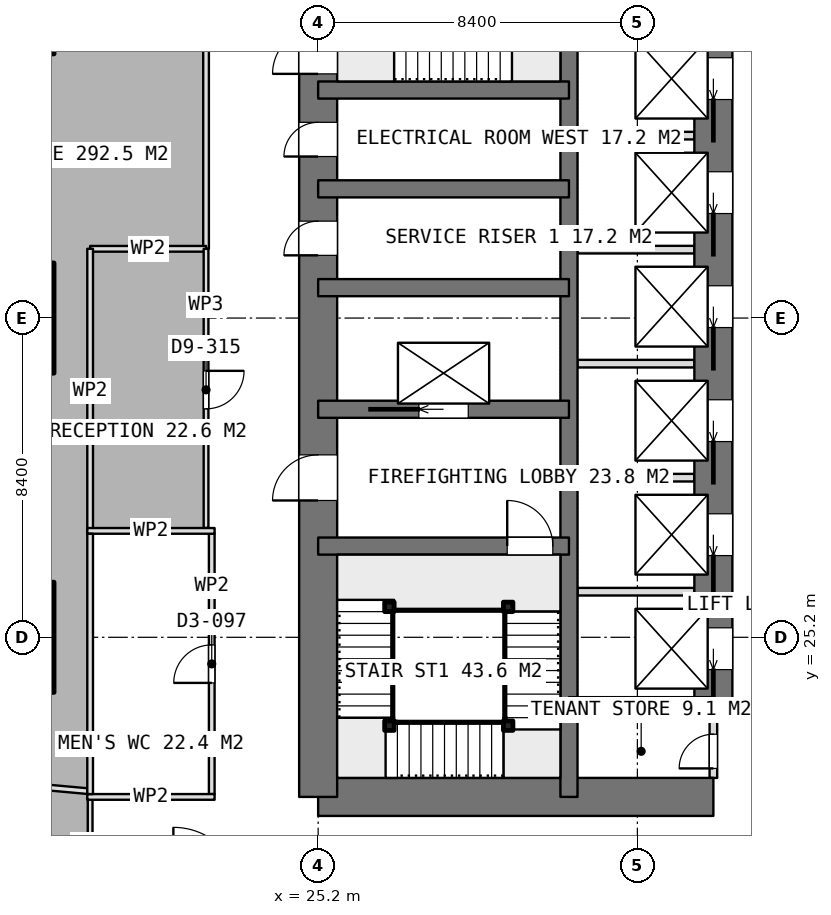
"""IFC4 building model, lengths in metres.
Left out: names, types, materials, properties, quantities, classifications, styles, units other than length and angle.
Written with IfcOpenShell. Run it as: python <this file> out.ifc"""

import sys

from ifc_helpers import new_model, si_unit, direction, frame, frame_2d, origin, origin_2d, place, context, subcontext, project, spatial, rectangle, extrude, element, fill, save


model = new_model("IFC4")
c1 = context("Model", 3, precision=1e-05, world=origin(), true_north=direction((0.0, 1.0)))
c2 = subcontext(c1, "Body", "Model", "MODEL_VIEW")
j1 = project(units=[si_unit("LENGTHUNIT", "METRE"), si_unit("PLANEANGLEUNIT", "RADIAN")], contexts=[c1])
p1 = place(None, origin())
s1 = spatial("IfcSite", under=j1, at=p1, CompositionType="ELEMENT")
p2 = place(p1, origin())
s2 = spatial("IfcBuilding", under=s1, at=p2, CompositionType="ELEMENT")
p3 = place(p2, frame((0.0, 0.0, 95.3)))
s3 = spatial("IfcBuildingStorey", under=s2, at=p3, CompositionType="ELEMENT", Elevation=95.3)
p4 = place(p3, frame((25.2, 21.0, 0.0), z_axis=(0.0, 0.0, 1.0), x_axis=(1.0, 0.0, 0.0)))
e1 = element("IfcWall", 1, at=p4, inside=s3, PredefinedType="SHEAR", context=c2, shape_type="SweptSolid", body=[
    extrude(rectangle(XDim=10.4, YDim=1.0, at=frame_2d((5.2, 0.0))), origin(), (0.0, 0.0, 1.0), 3.75),
])
p5 = place(p3, frame((25.2, 21.0, 0.0), z_axis=(0.0, 0.0, 1.0), x_axis=(0.0, 1.0, 0.0)))
e2 = element("IfcWall", 2, at=p5, inside=s3, PredefinedType="SHEAR", context=c2, shape_type="SweptSolid", body=[
    extrude(rectangle(XDim=25.2, YDim=1.0, at=frame_2d((12.6, 0.0))), origin(), (0.0, 0.0, 1.0), 3.75),
])
p6 = place(p5, frame((7.8, 0.0, 0.0)))
e3 = element("IfcOpeningElement", 3, at=p6, cuts=e2, PredefinedType="OPENING", context=c2, shape_type="SweptSolid", body=[
    extrude(rectangle(XDim=1.2, YDim=2.1, at=frame_2d((0.6, 1.05))), frame((0.0, 0.51, 0.0), z_axis=(0.0, -1.0, 0.0), x_axis=(1.0, 0.0, 0.0)), (0.0, 0.0, 1.0), 1.02),
])
p7 = place(p5, frame((14.25, 0.0, 0.0)))
e4 = element("IfcOpeningElement", 4, at=p7, cuts=e2, PredefinedType="OPENING", context=c2, shape_type="SweptSolid", body=[
    extrude(rectangle(XDim=0.9, YDim=2.1, at=frame_2d((0.45, 1.05))), frame((0.0, 0.51, 0.0), z_axis=(0.0, -1.0, 0.0), x_axis=(1.0, 0.0, 0.0)), (0.0, 0.0, 1.0), 1.02),
])
p8 = place(p5, frame((16.85, 0.0, 0.0)))
e5 = element("IfcOpeningElement", 5, at=p8, cuts=e2, PredefinedType="OPENING", context=c2, shape_type="SweptSolid", body=[
    extrude(rectangle(XDim=0.9, YDim=2.1, at=frame_2d((0.45, 1.05))), frame((0.0, 0.51, 0.0), z_axis=(0.0, -1.0, 0.0), x_axis=(1.0, 0.0, 0.0)), (0.0, 0.0, 1.0), 1.02),
])
p9 = place(p5, frame((19.025, 0.0, 0.0)))
e6 = element("IfcOpeningElement", 6, at=p9, cuts=e2, PredefinedType="OPENING", context=c2, shape_type="SweptSolid", body=[
    extrude(rectangle(XDim=1.2, YDim=2.1, at=frame_2d((0.6, 1.05))), frame((0.0, 0.51, 0.0), z_axis=(0.0, -1.0, 0.0), x_axis=(1.0, 0.0, 0.0)), (0.0, 0.0, 1.0), 1.02),
])
p10 = place(p3, frame((31.8, 21.0, 0.0), z_axis=(0.0, 0.0, 1.0), x_axis=(0.0, 1.0, 0.0)))
e7 = element("IfcWall", 7, at=p10, inside=s3, PredefinedType="SHEAR", context=c2, shape_type="SweptSolid", body=[
    extrude(rectangle(XDim=25.2, YDim=0.45, at=frame_2d((12.6, 0.0))), origin(), (0.0, 0.0, 1.0), 3.75),
])
p11 = place(p3, frame((35.6, 23.4, 0.0), z_axis=(0.0, 0.0, 1.0), x_axis=(0.0, 1.0, 0.0)))
e8 = element("IfcWall", 8, at=p11, inside=s3, PredefinedType="SHEAR", context=c2, shape_type="SweptSolid", body=[
    extrude(rectangle(XDim=18.0, YDim=1.0, at=frame_2d((9.0, 0.0))), origin(), (0.0, 0.0, 1.0), 3.75),
])
p12 = place(p11, frame((0.95, 0.0, 0.0)))
e9 = element("IfcOpeningElement", 9, at=p12, cuts=e8, PredefinedType="OPENING", context=c2, shape_type="SweptSolid", body=[
    extrude(rectangle(XDim=1.1, YDim=2.1, at=frame_2d((0.55, 1.05))), frame((0.0, 0.51, 0.0), z_axis=(0.0, -1.0, 0.0), x_axis=(1.0, 0.0, 0.0)), (0.0, 0.0, 1.0), 1.02),
])
p13 = place(p11, frame((3.95, 0.0, 0.0)))
e10 = element("IfcOpeningElement", 10, at=p13, cuts=e8, PredefinedType="OPENING", context=c2, shape_type="SweptSolid", body=[
    extrude(rectangle(XDim=1.1, YDim=2.1, at=frame_2d((0.55, 1.05))), frame((0.0, 0.51, 0.0), z_axis=(0.0, -1.0, 0.0), x_axis=(1.0, 0.0, 0.0)), (0.0, 0.0, 1.0), 1.02),
])
p14 = place(p11, frame((6.95, 0.0, 0.0)))
e11 = element("IfcOpeningElement", 11, at=p14, cuts=e8, PredefinedType="OPENING", context=c2, shape_type="SweptSolid", body=[
    extrude(rectangle(XDim=1.1, YDim=2.1, at=frame_2d((0.55, 1.05))), frame((0.0, 0.51, 0.0), z_axis=(0.0, -1.0, 0.0), x_axis=(1.0, 0.0, 0.0)), (0.0, 0.0, 1.0), 1.02),
])
p15 = place(p11, frame((9.95, 0.0, 0.0)))
e12 = element("IfcOpeningElement", 12, at=p15, cuts=e8, PredefinedType="OPENING", context=c2, shape_type="SweptSolid", body=[
    extrude(rectangle(XDim=1.1, YDim=2.1, at=frame_2d((0.55, 1.05))), frame((0.0, 0.51, 0.0), z_axis=(0.0, -1.0, 0.0), x_axis=(1.0, 0.0, 0.0)), (0.0, 0.0, 1.0), 1.02),
])
p16 = place(p11, frame((12.95, 0.0, 0.0)))
e13 = element("IfcOpeningElement", 13, at=p16, cuts=e8, PredefinedType="OPENING", context=c2, shape_type="SweptSolid", body=[
    extrude(rectangle(XDim=1.1, YDim=2.1, at=frame_2d((0.55, 1.05))), frame((0.0, 0.51, 0.0), z_axis=(0.0, -1.0, 0.0), x_axis=(1.0, 0.0, 0.0)), (0.0, 0.0, 1.0), 1.02),
])
p17 = place(p11, frame((15.95, 0.0, 0.0)))
e14 = element("IfcOpeningElement", 14, at=p17, cuts=e8, PredefinedType="OPENING", context=c2, shape_type="SweptSolid", body=[
    extrude(rectangle(XDim=1.1, YDim=2.1, at=frame_2d((0.55, 1.05))), frame((0.0, 0.51, 0.0), z_axis=(0.0, -1.0, 0.0), x_axis=(1.0, 0.0, 0.0)), (0.0, 0.0, 1.0), 1.02),
])
p18 = place(p3, frame((31.8, 23.4, 0.0), z_axis=(0.0, 0.0, 1.0), x_axis=(1.0, 0.0, 0.0)))
e15 = element("IfcWall", 15, at=p18, inside=s3, PredefinedType="SHEAR", context=c2, shape_type="SweptSolid", body=[
    extrude(rectangle(XDim=3.8, YDim=0.45, at=frame_2d((1.9, 0.0))), origin(), (0.0, 0.0, 1.0), 3.75),
])
p19 = place(p3, frame((25.2, 27.6, 0.0), z_axis=(0.0, 0.0, 1.0), x_axis=(1.0, 0.0, 0.0)))
e16 = element("IfcWall", 16, at=p19, inside=s3, PredefinedType="SHEAR", context=c2, shape_type="SweptSolid", body=[
    extrude(rectangle(XDim=6.6, YDim=0.45, at=frame_2d((3.3, 0.0))), origin(), (0.0, 0.0, 1.0), 3.75),
])
p20 = place(p19, frame((4.975, 0.0, 0.0)))
e17 = element("IfcOpeningElement", 17, at=p20, cuts=e16, PredefinedType="OPENING", context=c2, shape_type="SweptSolid", body=[
    extrude(rectangle(XDim=1.2, YDim=2.1, at=frame_2d((0.6, 1.05))), frame((0.0, 0.235, 0.0), z_axis=(0.0, -1.0, 0.0), x_axis=(1.0, 0.0, 0.0)), (0.0, 0.0, 1.0), 0.47),
])
p21 = place(p3, frame((25.2, 31.2, 0.0), z_axis=(0.0, 0.0, 1.0), x_axis=(1.0, 0.0, 0.0)))
e18 = element("IfcWall", 18, at=p21, inside=s3, PredefinedType="SHEAR", context=c2, shape_type="SweptSolid", body=[
    extrude(rectangle(XDim=6.6, YDim=0.45, at=frame_2d((3.3, 0.0))), origin(), (0.0, 0.0, 1.0), 3.75),
])
p22 = place(p21, frame((2.65, 0.0, 0.0)))
e19 = element("IfcOpeningElement", 19, at=p22, cuts=e18, PredefinedType="OPENING", context=c2, shape_type="SweptSolid", body=[
    extrude(rectangle(XDim=1.3, YDim=2.1, at=frame_2d((0.65, 1.05))), frame((0.0, 0.235, 0.0), z_axis=(0.0, -1.0, 0.0), x_axis=(1.0, 0.0, 0.0)), (0.0, 0.0, 1.0), 0.47),
])
for number, where, z_axis, x_axis in (
    (20, (25.2, 34.4, 0.0), (0.0, 0.0, 1.0), (1.0, 0.0, 0.0)),
    (21, (25.2, 37.0, 0.0), (0.0, 0.0, 1.0), (1.0, 0.0, 0.0)),
    (22, (25.2, 39.6, 0.0), (0.0, 0.0, 1.0), (1.0, 0.0, 0.0)),
):
    element("IfcWall", number, at=place(p3, frame(where, z_axis=z_axis, x_axis=x_axis)), inside=s3, PredefinedType="SHEAR", context=c2, shape_type="SweptSolid", body=[
        extrude(rectangle(XDim=6.6, YDim=0.45, at=frame_2d((3.3, 0.0))), origin(), (0.0, 0.0, 1.0), 3.75),
    ])
for number, where, z_axis, x_axis in (
    (23, (16.8, 25.2, 0.0), (0.0, 0.0, 1.0), (1.0, 0.0, 0.0)),
    (24, (16.8, 33.6, 0.0), (0.0, 0.0, 1.0), (1.0, 0.0, 0.0)),
    (25, (16.8, 42.0, 0.0), (0.0, 0.0, 1.0), (1.0, 0.0, 0.0)),
):
    element("IfcColumn", number, at=place(p3, frame(where, z_axis=z_axis, x_axis=x_axis)), inside=s3, PredefinedType="COLUMN", context=c2, shape_type="SweptSolid", body=[
        extrude(rectangle(XDim=2.9, YDim=2.9, at=origin_2d()), origin(), (0.0, 0.0, 1.0), 3.75),
    ])
for number, where, z_axis, x_axis in (
    (26, (32.025, 26.4, 0.0), (0.0, 0.0, 1.0), (1.0, 0.0, 0.0)),
    (27, (32.025, 29.4, 0.0), (0.0, 0.0, 1.0), (1.0, 0.0, 0.0)),
    (28, (32.025, 32.4, 0.0), (0.0, 0.0, 1.0), (1.0, 0.0, 0.0)),
    (29, (32.025, 35.4, 0.0), (0.0, 0.0, 1.0), (1.0, 0.0, 0.0)),
    (30, (32.025, 38.4, 0.0), (0.0, 0.0, 1.0), (1.0, 0.0, 0.0)),
):
    element("IfcWall", number, at=place(p3, frame(where, z_axis=z_axis, x_axis=x_axis)), inside=s3, PredefinedType="PARTITIONING", context=c2, shape_type="SweptSolid", body=[
        extrude(rectangle(XDim=3.075, YDim=0.2, at=frame_2d((1.538, 0.0))), origin(), (0.0, 0.0, 1.0), 3.5),
    ])
p23 = place(p3, frame((35.6, 21.5, 0.0), z_axis=(0.0, 0.0, 1.0), x_axis=(0.0, 1.0, 0.0)))
e31 = element("IfcWall", 31, at=p23, inside=s3, PredefinedType="PARTITIONING", context=c2, shape_type="SweptSolid", body=[
    extrude(rectangle(XDim=1.675, YDim=0.2, at=frame_2d((0.837, 0.0))), origin(), (0.0, 0.0, 1.0), 3.5),
])
p24 = place(p23, frame((0.25, 0.0, 0.0)))
e32 = element("IfcOpeningElement", 32, at=p24, cuts=e31, PredefinedType="OPENING", context=c2, shape_type="SweptSolid", body=[
    extrude(rectangle(XDim=0.9, YDim=2.1, at=frame_2d((0.45, 1.05))), frame((0.0, 0.11, 0.0), z_axis=(0.0, -1.0, 0.0), x_axis=(1.0, 0.0, 0.0)), (0.0, 0.0, 1.0), 0.22),
])
for number, where, z_axis, x_axis in (
    (33, (19.125, 21.0, 0.0), (0.0, 0.0, 1.0), (1.0, 0.0, 0.0)),
    (34, (19.125, 28.0, 0.0), (0.0, 0.0, 1.0), (1.0, 0.0, 0.0)),
):
    element("IfcWall", number, at=place(p3, frame(where, z_axis=z_axis, x_axis=x_axis)), inside=s3, PredefinedType="PARTITIONING", context=c2, shape_type="SweptSolid", body=[
        extrude(rectangle(XDim=3.35, YDim=0.15, at=frame_2d((1.675, 0.0))), origin(), (0.0, 0.0, 1.0), 3.5),
    ])
p25 = place(p3, frame((19.2, 21.075, 0.0), z_axis=(0.0, 0.0, 1.0), x_axis=(0.0, 1.0, 0.0)))
e35 = element("IfcWall", 35, at=p25, inside=s3, PredefinedType="PARTITIONING", context=c2, shape_type="SweptSolid", body=[
    extrude(rectangle(XDim=6.85, YDim=0.15, at=frame_2d((3.425, 0.0))), origin(), (0.0, 0.0, 1.0), 3.5),
])
p26 = place(p3, frame((22.4, 21.075, 0.0), z_axis=(0.0, 0.0, 1.0), x_axis=(0.0, 1.0, 0.0)))
e36 = element("IfcWall", 36, at=p26, inside=s3, PredefinedType="PARTITIONING", context=c2, shape_type="SweptSolid", body=[
    extrude(rectangle(XDim=6.85, YDim=0.15, at=frame_2d((3.425, 0.0))), origin(), (0.0, 0.0, 1.0), 3.5),
])
p27 = place(p26, frame((2.925, 0.0, 0.0)))
e37 = element("IfcOpeningElement", 37, at=p27, cuts=e36, PredefinedType="OPENING", context=c2, shape_type="SweptSolid", body=[
    extrude(rectangle(XDim=1.0, YDim=2.1, at=frame_2d((0.5, 1.05))), frame((0.0, 0.085, 0.0), z_axis=(0.0, -1.0, 0.0), x_axis=(1.0, 0.0, 0.0)), (0.0, 0.0, 1.0), 0.17),
])
p28 = place(p3, frame((22.25, 53.35, 0.0), z_axis=(0.0, 0.0, 1.0), x_axis=(0.0, -1.0, 0.0)))
e38 = element("IfcWall", 38, at=p28, inside=s3, PredefinedType="PARTITIONING", context=c2, shape_type="SweptSolid", body=[
    extrude(rectangle(XDim=17.928, YDim=0.15, at=frame_2d((8.964, 0.0))), origin(), (0.0, 0.0, 1.0), 3.5),
])
p29 = place(p28, frame((8.464, 0.0, 0.0)))
e39 = element("IfcOpeningElement", 39, at=p29, cuts=e38, PredefinedType="OPENING", context=c2, shape_type="SweptSolid", body=[
    extrude(rectangle(XDim=1.0, YDim=2.1, at=frame_2d((0.5, 1.05))), frame((0.0, 0.085, 0.0), z_axis=(0.0, -1.0, 0.0), x_axis=(1.0, 0.0, 0.0)), (0.0, 0.0, 1.0), 0.17),
])
p30 = place(p3, frame((22.25, 35.422, 0.0), z_axis=(0.0, 0.0, 1.0), x_axis=(-1.0, 0.0, 0.0)))
e40 = element("IfcWall", 40, at=p30, inside=s3, PredefinedType="PARTITIONING", context=c2, shape_type="SweptSolid", body=[
    extrude(rectangle(XDim=3.05, YDim=0.15, at=frame_2d((1.525, 0.0))), origin(), (0.0, 0.0, 1.0), 3.5),
])
p31 = place(p3, frame((19.2, 35.422, 0.0), z_axis=(0.0, 0.0, 1.0), x_axis=(0.0, -1.0, 0.0)))
e41 = element("IfcWall", 41, at=p31, inside=s3, PredefinedType="PARTITIONING", context=c2, shape_type="SweptSolid", body=[
    extrude(rectangle(XDim=7.497, YDim=0.15, at=frame_2d((3.749, 0.0))), origin(), (0.0, 0.0, 1.0), 3.5),
])
p32 = place(p3, frame((19.125, 21.153, 0.0), z_axis=(0.0, 0.0, 1.0), x_axis=(-0.99591033818, 0.090347099052, 0.0)))
e42 = element("IfcWall", 42, at=p32, inside=s3, PredefinedType="PARTITIONING", context=c2, shape_type="SweptSolid", body=[
    extrude(rectangle(XDim=3.851, YDim=0.15, at=frame_2d((1.925, 0.0))), origin(), (0.0, 0.0, 1.0), 3.5),
])
p33 = place(p3, frame((19.2, 21.074, 0.0), z_axis=(0.0, 0.0, 1.0), x_axis=(0.0, -1.0, 0.0)))
e43 = element("IfcWall", 43, at=p33, inside=s3, PredefinedType="PARTITIONING", context=c2, shape_type="SweptSolid", body=[
    extrude(rectangle(XDim=2.674, YDim=0.125, at=frame_2d((1.337, 0.0))), origin(), (0.0, 0.0, 1.0), 3.5),
])
p34 = place(p3, frame((22.25, 35.421, 0.0), z_axis=(0.0, 0.0, 1.0), x_axis=(0.0, -1.0, 0.0)))
e44 = element("IfcWall", 44, at=p34, inside=s3, PredefinedType="PARTITIONING", context=c2, shape_type="SweptSolid", body=[
    extrude(rectangle(XDim=7.346, YDim=0.125, at=frame_2d((3.673, 0.0))), origin(), (0.0, 0.0, 1.0), 3.5),
])
p35 = place(p34, frame((3.21, 0.0, 0.0)))
e45 = element("IfcOpeningElement", 45, at=p35, cuts=e44, PredefinedType="OPENING", context=c2, shape_type="SweptSolid", body=[
    extrude(rectangle(XDim=1.0, YDim=2.1, at=frame_2d((0.5, 1.05))), frame((0.0, 0.073, 0.0), z_axis=(0.0, -1.0, 0.0), x_axis=(1.0, 0.0, 0.0)), (0.0, 0.0, 1.0), 0.145),
])
for number, where, z_axis, x_axis in (
    (46, (30.2, 26.0, 0.0), (0.0, 0.0, 1.0), (1.0, 0.0, 0.0)),
    (47, (30.2, 22.875, 0.0), (0.0, 0.0, 1.0), (1.0, 0.0, 0.0)),
    (48, (27.075, 22.875, 0.0), (0.0, 0.0, 1.0), (1.0, 0.0, 0.0)),
    (49, (27.075, 26.0, 0.0), (0.0, 0.0, 1.0), (1.0, 0.0, 0.0)),
):
    element("IfcColumn", number, at=place(p3, frame(where, z_axis=z_axis, x_axis=x_axis)), inside=s3, PredefinedType="COLUMN", context=c2, shape_type="SweptSolid", body=[
        extrude(rectangle(XDim=0.25, YDim=0.25, at=origin_2d()), origin(), (0.0, 0.0, 1.0), 3.75),
    ])
p36 = place(p6, origin())
e50 = element("IfcDoor", 50, at=p36, inside=s3, OperationType="SINGLE_SWING_LEFT", PredefinedType="DOOR", context=c2, shape_type="SweptSolid", body=[
    extrude(rectangle(XDim=1.2, YDim=2.1, at=frame_2d((0.6, 1.05))), frame((0.0, 0.025, 0.0), z_axis=(0.0, -1.0, 0.0), x_axis=(1.0, 0.0, 0.0)), (0.0, 0.0, 1.0), 0.05),
])
fill(e3, e50)
p37 = place(p7, origin())
e51 = element("IfcDoor", 51, at=p37, inside=s3, OperationType="SINGLE_SWING_LEFT", PredefinedType="DOOR", context=c2, shape_type="SweptSolid", body=[
    extrude(rectangle(XDim=0.9, YDim=2.1, at=frame_2d((0.45, 1.05))), frame((0.0, 0.025, 0.0), z_axis=(0.0, -1.0, 0.0), x_axis=(1.0, 0.0, 0.0)), (0.0, 0.0, 1.0), 0.05),
])
fill(e4, e51)
p38 = place(p8, origin())
e52 = element("IfcDoor", 52, at=p38, inside=s3, OperationType="SINGLE_SWING_LEFT", PredefinedType="DOOR", context=c2, shape_type="SweptSolid", body=[
    extrude(rectangle(XDim=0.9, YDim=2.1, at=frame_2d((0.45, 1.05))), frame((0.0, 0.025, 0.0), z_axis=(0.0, -1.0, 0.0), x_axis=(1.0, 0.0, 0.0)), (0.0, 0.0, 1.0), 0.05),
])
fill(e5, e52)
p39 = place(p24, origin())
e53 = element("IfcDoor", 53, at=p39, inside=s3, OperationType="SINGLE_SWING_LEFT", PredefinedType="DOOR", context=c2, shape_type="SweptSolid", body=[
    extrude(rectangle(XDim=0.9, YDim=2.1, at=frame_2d((0.45, 1.05))), frame((0.0, 0.025, 0.0), z_axis=(0.0, -1.0, 0.0), x_axis=(1.0, 0.0, 0.0)), (0.0, 0.0, 1.0), 0.05),
])
fill(e32, e53)
p40 = place(p12, origin())
e54 = element("IfcDoor", 54, at=p40, inside=s3, OperationType="SLIDING_TO_LEFT", PredefinedType="USERDEFINED", context=c2, shape_type="SweptSolid", body=[
    extrude(rectangle(XDim=1.1, YDim=2.1, at=frame_2d((0.55, 1.05))), frame((0.0, 0.025, 0.0), z_axis=(0.0, -1.0, 0.0), x_axis=(1.0, 0.0, 0.0)), (0.0, 0.0, 1.0), 0.05),
])
fill(e9, e54)
p41 = place(p13, origin())
e55 = element("IfcDoor", 55, at=p41, inside=s3, OperationType="SLIDING_TO_LEFT", PredefinedType="USERDEFINED", context=c2, shape_type="SweptSolid", body=[
    extrude(rectangle(XDim=1.1, YDim=2.1, at=frame_2d((0.55, 1.05))), frame((0.0, 0.025, 0.0), z_axis=(0.0, -1.0, 0.0), x_axis=(1.0, 0.0, 0.0)), (0.0, 0.0, 1.0), 0.05),
])
fill(e10, e55)
p42 = place(p14, origin())
e56 = element("IfcDoor", 56, at=p42, inside=s3, OperationType="SLIDING_TO_LEFT", PredefinedType="USERDEFINED", context=c2, shape_type="SweptSolid", body=[
    extrude(rectangle(XDim=1.1, YDim=2.1, at=frame_2d((0.55, 1.05))), frame((0.0, 0.025, 0.0), z_axis=(0.0, -1.0, 0.0), x_axis=(1.0, 0.0, 0.0)), (0.0, 0.0, 1.0), 0.05),
])
fill(e11, e56)
p43 = place(p15, origin())
e57 = element("IfcDoor", 57, at=p43, inside=s3, OperationType="SLIDING_TO_LEFT", PredefinedType="USERDEFINED", context=c2, shape_type="SweptSolid", body=[
    extrude(rectangle(XDim=1.1, YDim=2.1, at=frame_2d((0.55, 1.05))), frame((0.0, 0.025, 0.0), z_axis=(0.0, -1.0, 0.0), x_axis=(1.0, 0.0, 0.0)), (0.0, 0.0, 1.0), 0.05),
])
fill(e12, e57)
p44 = place(p16, origin())
e58 = element("IfcDoor", 58, at=p44, inside=s3, OperationType="SLIDING_TO_LEFT", PredefinedType="USERDEFINED", context=c2, shape_type="SweptSolid", body=[
    extrude(rectangle(XDim=1.1, YDim=2.1, at=frame_2d((0.55, 1.05))), frame((0.0, 0.025, 0.0), z_axis=(0.0, -1.0, 0.0), x_axis=(1.0, 0.0, 0.0)), (0.0, 0.0, 1.0), 0.05),
])
fill(e13, e58)
p45 = place(p17, origin())
e59 = element("IfcDoor", 59, at=p45, inside=s3, OperationType="SLIDING_TO_LEFT", PredefinedType="USERDEFINED", context=c2, shape_type="SweptSolid", body=[
    extrude(rectangle(XDim=1.1, YDim=2.1, at=frame_2d((0.55, 1.05))), frame((0.0, 0.025, 0.0), z_axis=(0.0, -1.0, 0.0), x_axis=(1.0, 0.0, 0.0)), (0.0, 0.0, 1.0), 0.05),
])
fill(e14, e59)
p46 = place(p22, origin())
e60 = element("IfcDoor", 60, at=p46, inside=s3, OperationType="SLIDING_TO_LEFT", PredefinedType="USERDEFINED", context=c2, shape_type="SweptSolid", body=[
    extrude(rectangle(XDim=1.3, YDim=2.1, at=frame_2d((0.65, 1.05))), frame((0.0, 0.025, 0.0), z_axis=(0.0, -1.0, 0.0), x_axis=(1.0, 0.0, 0.0)), (0.0, 0.0, 1.0), 0.05),
])
fill(e19, e60)
p47 = place(p27, origin())
e61 = element("IfcDoor", 61, at=p47, inside=s3, OperationType="SINGLE_SWING_LEFT", PredefinedType="DOOR", context=c2, shape_type="SweptSolid", body=[
    extrude(rectangle(XDim=1.0, YDim=2.1, at=frame_2d((0.5, 1.05))), frame((0.0, 0.025, 0.0), z_axis=(0.0, -1.0, 0.0), x_axis=(1.0, 0.0, 0.0)), (0.0, 0.0, 1.0), 0.05),
])
fill(e37, e61)
p48 = place(p35, origin())
e62 = element("IfcDoor", 62, at=p48, inside=s3, OperationType="SINGLE_SWING_LEFT", PredefinedType="DOOR", context=c2, shape_type="SweptSolid", body=[
    extrude(rectangle(XDim=1.0, YDim=2.1, at=frame_2d((0.5, 1.05))), frame((0.0, 0.025, 0.0), z_axis=(0.0, -1.0, 0.0), x_axis=(1.0, 0.0, 0.0)), (0.0, 0.0, 1.0), 0.05),
])
fill(e45, e62)
p49 = place(p20, origin())
e63 = element("IfcDoor", 63, at=p49, inside=s3, OperationType="SINGLE_SWING_RIGHT", PredefinedType="DOOR", context=c2, shape_type="SweptSolid", body=[
    extrude(rectangle(XDim=1.2, YDim=2.1, at=frame_2d((0.6, 1.05))), frame((0.0, 0.025, 0.0), z_axis=(0.0, -1.0, 0.0), x_axis=(1.0, 0.0, 0.0)), (0.0, 0.0, 1.0), 0.05),
])
fill(e17, e63)
p50 = place(p9, origin())
e64 = element("IfcDoor", 64, at=p50, inside=s3, OperationType="SINGLE_SWING_RIGHT", PredefinedType="DOOR", context=c2, shape_type="SweptSolid", body=[
    extrude(rectangle(XDim=1.2, YDim=2.1, at=frame_2d((0.6, 1.05))), frame((0.0, 0.025, 0.0), z_axis=(0.0, -1.0, 0.0), x_axis=(1.0, 0.0, 0.0)), (0.0, 0.0, 1.0), 0.05),
])
fill(e6, e64)
save(model, sys.argv[1])
